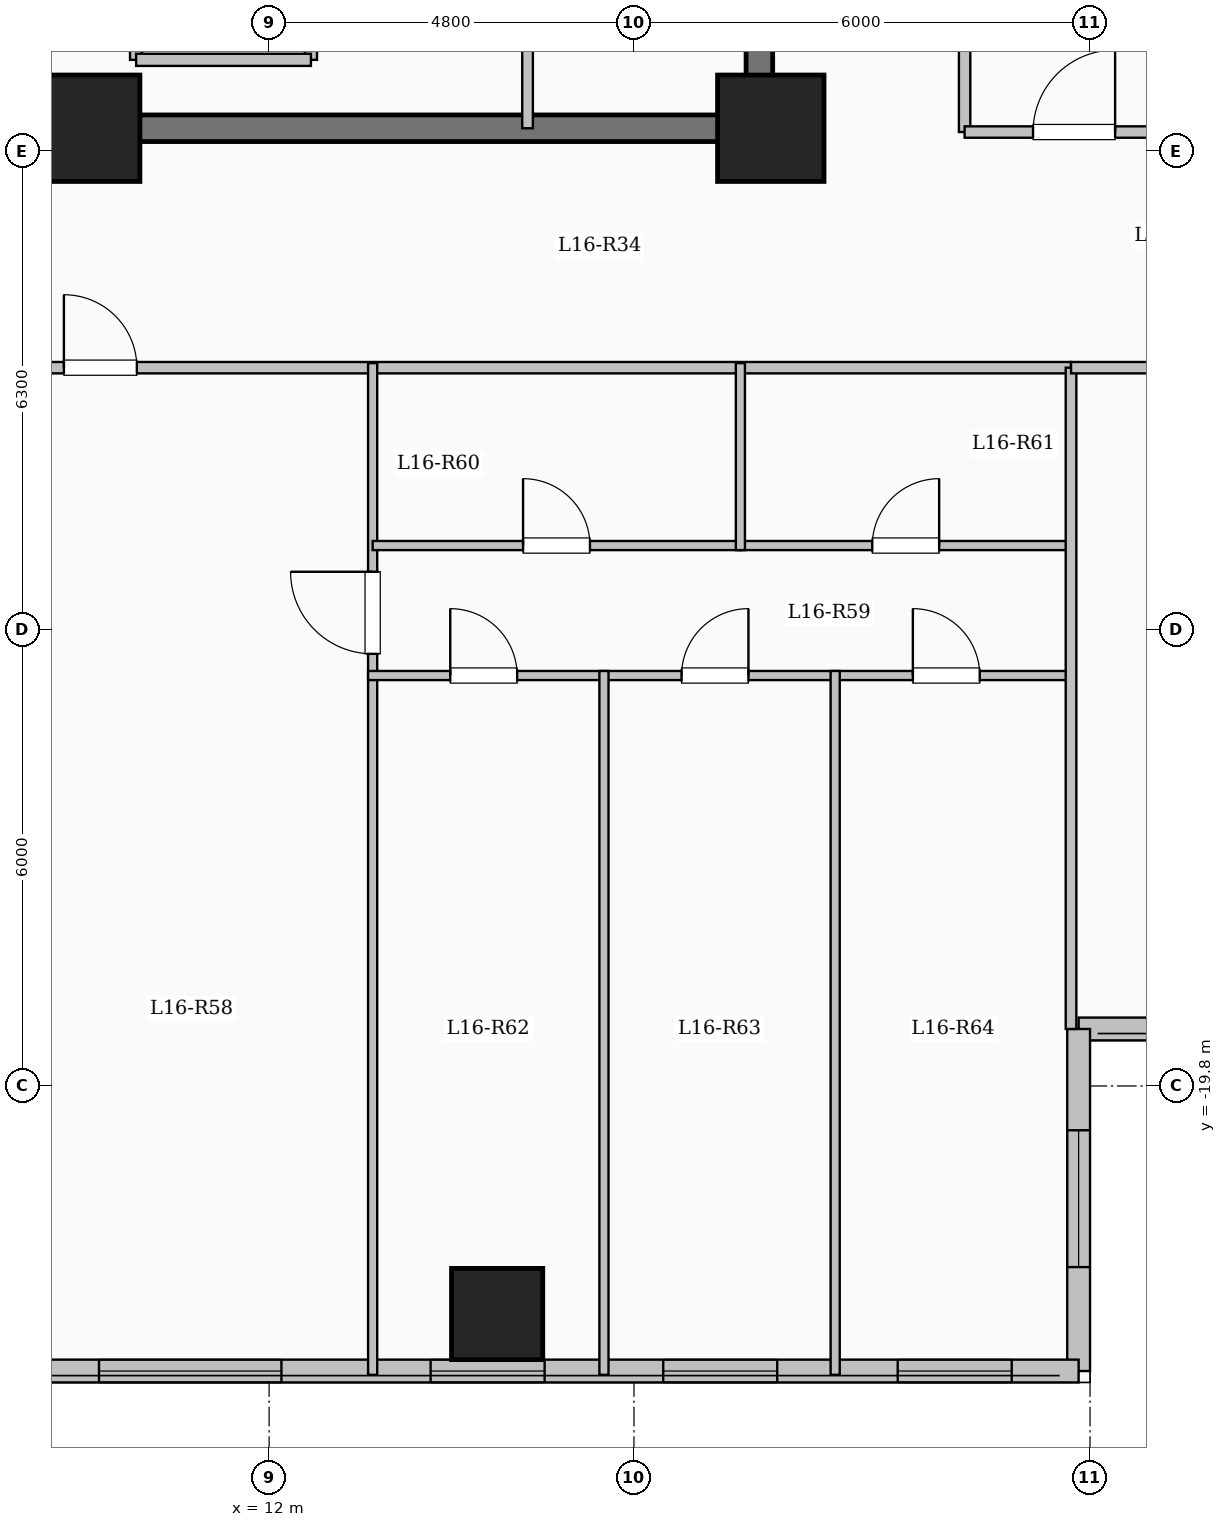
"""IFC4 building model, lengths in metres.
Left out: names, types, materials, properties, quantities, classifications, styles, units other than length and angle.
Written with IfcOpenShell. Run it as: python <this file> out.ifc"""

import sys

from ifc_helpers import new_model, si_unit, direction, frame, frame_2d, origin, origin_2d, place, context, subcontext, project, spatial, rectangle, extrude, element, fill, save


model = new_model("IFC4")
c1 = context("Model", 3, precision=1e-05, world=origin(), true_north=direction((0.0, 1.0)))
c2 = subcontext(c1, "Body", "Model", "MODEL_VIEW")
j1 = project(units=[si_unit("LENGTHUNIT", "METRE"), si_unit("PLANEANGLEUNIT", "RADIAN")], contexts=[c1])
p1 = place(None, origin())
s1 = spatial("IfcSite", under=j1, at=p1, CompositionType="ELEMENT")
p2 = place(p1, origin())
s2 = spatial("IfcBuilding", under=s1, at=p2, CompositionType="ELEMENT")
p3 = place(p2, frame((0.0, 0.0, 60.85)))
s3 = spatial("IfcBuildingStorey", under=s2, at=p3, CompositionType="ELEMENT", Elevation=60.85)
for number, where, z_axis, x_axis in (
    (1, (9.6, -7.2, 0.0), (0.0, 0.0, 1.0), (1.0, 0.0, 0.0)),
    (2, (18.6, -7.2, 0.0), (0.0, 0.0, 1.0), (1.0, 0.0, 0.0)),
):
    element("IfcColumn", number, at=place(p3, frame(where, z_axis=z_axis, x_axis=x_axis)), inside=s3, PredefinedType="COLUMN", context=c2, shape_type="SweptSolid", body=[
        extrude(rectangle(XDim=1.4, YDim=1.4, at=origin_2d()), origin(), (0.0, 0.0, 1.0), 3.35),
    ])
p4 = place(p3, frame((15.0, -22.8, 0.0), z_axis=(0.0, 0.0, 1.0), x_axis=(1.0, 0.0, 0.0)))
e3 = element("IfcColumn", 3, at=p4, inside=s3, PredefinedType="COLUMN", context=c2, shape_type="SweptSolid", body=[
    extrude(rectangle(XDim=1.2, YDim=1.2, at=origin_2d()), origin(), (0.0, 0.0, 1.0), 3.35),
])
p5 = place(p3, frame((28.65, -19.05, 0.0), z_axis=(0.0, 0.0, 1.0), x_axis=(-1.0, 0.0, 0.0)))
e4 = element("IfcWall", 4, at=p5, inside=s3, PredefinedType="SOLIDWALL", context=c2, shape_type="SweptSolid", body=[
    extrude(rectangle(XDim=6.0, YDim=0.3, at=frame_2d((3.0, 0.0))), origin(), (0.0, 0.0, 1.0), 3.05),
])
p6 = place(p5, frame((1.825, 0.0, 0.9)))
e5 = element("IfcOpeningElement", 5, at=p6, cuts=e4, PredefinedType="OPENING", context=c2, shape_type="SweptSolid", body=[
    extrude(rectangle(XDim=2.4, YDim=1.8, at=frame_2d((1.2, 0.9))), frame((0.0, 0.16, 0.0), z_axis=(0.0, -1.0, 0.0), x_axis=(1.0, 0.0, 0.0)), (0.0, 0.0, 1.0), 0.32),
])
p7 = place(p3, frame((22.65, -19.05, 0.0), z_axis=(0.0, 0.0, 1.0), x_axis=(0.0, -1.0, 0.0)))
e6 = element("IfcWall", 6, at=p7, inside=s3, PredefinedType="SOLIDWALL", context=c2, shape_type="SweptSolid", body=[
    extrude(rectangle(XDim=4.5, YDim=0.3, at=frame_2d((2.25, 0.0))), origin(), (0.0, 0.0, 1.0), 3.05),
])
p8 = place(p7, frame((1.333, 0.0, 0.9)))
e7 = element("IfcOpeningElement", 7, at=p8, cuts=e6, PredefinedType="OPENING", context=c2, shape_type="SweptSolid", body=[
    extrude(rectangle(XDim=1.8, YDim=1.65, at=frame_2d((0.9, 0.825))), frame((0.0, 0.16, 0.0), z_axis=(0.0, -1.0, 0.0), x_axis=(1.0, 0.0, 0.0)), (0.0, 0.0, 1.0), 0.32),
])
p9 = place(p3, frame((22.65, -23.55, 0.0), z_axis=(0.0, 0.0, 1.0), x_axis=(-1.0, 0.0, 0.0)))
e8 = element("IfcWall", 8, at=p9, inside=s3, PredefinedType="SOLIDWALL", context=c2, shape_type="SweptSolid", body=[
    extrude(rectangle(XDim=15.3, YDim=0.3, at=frame_2d((7.65, 0.0))), origin(), (0.0, 0.0, 1.0), 3.05),
])
p10 = place(p9, frame((0.88, 0.0, 0.9)))
e9 = element("IfcOpeningElement", 9, at=p10, cuts=e8, PredefinedType="OPENING", context=c2, shape_type="SweptSolid", body=[
    extrude(rectangle(XDim=1.5, YDim=1.65, at=frame_2d((0.75, 0.825))), frame((0.0, 0.16, 0.0), z_axis=(0.0, -1.0, 0.0), x_axis=(1.0, 0.0, 0.0)), (0.0, 0.0, 1.0), 0.32),
])
p11 = place(p9, frame((3.965, 0.0, 0.9)))
e10 = element("IfcOpeningElement", 10, at=p11, cuts=e8, PredefinedType="OPENING", context=c2, shape_type="SweptSolid", body=[
    extrude(rectangle(XDim=1.5, YDim=1.65, at=frame_2d((0.75, 0.825))), frame((0.0, 0.16, 0.0), z_axis=(0.0, -1.0, 0.0), x_axis=(1.0, 0.0, 0.0)), (0.0, 0.0, 1.0), 0.32),
])
p12 = place(p9, frame((7.025, 0.0, 0.9)))
e11 = element("IfcOpeningElement", 11, at=p12, cuts=e8, PredefinedType="OPENING", context=c2, shape_type="SweptSolid", body=[
    extrude(rectangle(XDim=1.5, YDim=1.65, at=frame_2d((0.75, 0.825))), frame((0.0, 0.16, 0.0), z_axis=(0.0, -1.0, 0.0), x_axis=(1.0, 0.0, 0.0)), (0.0, 0.0, 1.0), 0.32),
])
p13 = place(p9, frame((10.488, 0.0, 0.9)))
e12 = element("IfcOpeningElement", 12, at=p13, cuts=e8, PredefinedType="OPENING", context=c2, shape_type="SweptSolid", body=[
    extrude(rectangle(XDim=2.4, YDim=1.8, at=frame_2d((1.2, 0.9))), frame((0.0, 0.16, 0.0), z_axis=(0.0, -1.0, 0.0), x_axis=(1.0, 0.0, 0.0)), (0.0, 0.0, 1.0), 0.32),
])
p14 = place(p9, frame((14.303, 0.0, 0.95)))
e13 = element("IfcOpeningElement", 13, at=p14, cuts=e8, PredefinedType="OPENING", context=c2, shape_type="SweptSolid", body=[
    extrude(rectangle(XDim=0.85, YDim=1.5, at=frame_2d((0.425, 0.75))), frame((0.0, 0.16, 0.0), z_axis=(0.0, -1.0, 0.0), x_axis=(1.0, 0.0, 0.0)), (0.0, 0.0, 1.0), 0.32),
])
for number, where, z_axis, x_axis in (
    (14, (10.25, -6.3, 0.0), (0.0, 0.0, 1.0), (0.0, 1.0, 0.0)),
    (15, (12.55, -6.3, 0.0), (0.0, 0.0, 1.0), (0.0, 1.0, 0.0)),
):
    element("IfcWall", number, at=place(p3, frame(where, z_axis=z_axis, x_axis=x_axis)), inside=s3, PredefinedType="SOLIDWALL", context=c2, shape_type="SweptSolid", body=[
        extrude(rectangle(XDim=2.6, YDim=0.16, at=frame_2d((1.3, 0.0))), origin(), (0.0, 0.0, 1.0), 3.05),
    ])
p15 = place(p3, frame((10.25, -6.3, 0.0), z_axis=(0.0, 0.0, 1.0), x_axis=(1.0, 0.0, 0.0)))
e16 = element("IfcWall", 16, at=p15, inside=s3, PredefinedType="SOLIDWALL", context=c2, shape_type="SweptSolid", body=[
    extrude(rectangle(XDim=2.3, YDim=0.16, at=frame_2d((1.15, 0.0))), origin(), (0.0, 0.0, 1.0), 3.05),
])
p16 = place(p3, frame((18.45, -7.375, 0.0), z_axis=(0.0, 0.0, 1.0), x_axis=(0.0, 1.0, 0.0)))
e17 = element("IfcWall", 17, at=p16, inside=s3, PredefinedType="SHEAR", context=c2, shape_type="SweptSolid", body=[
    extrude(rectangle(XDim=14.05, YDim=0.35, at=frame_2d((7.025, 0.0))), origin(), (0.0, 0.0, 1.0), 3.35),
])
p17 = place(p3, frame((10.075, -7.2, 0.0), z_axis=(0.0, 0.0, 1.0), x_axis=(1.0, 0.0, 0.0)))
e18 = element("IfcWall", 18, at=p17, inside=s3, PredefinedType="SHEAR", context=c2, shape_type="SweptSolid", body=[
    extrude(rectangle(XDim=8.55, YDim=0.35, at=frame_2d((4.275, 0.0))), origin(), (0.0, 0.0, 1.0), 3.35),
])
p18 = place(p3, frame((15.4, -7.2, 0.0), z_axis=(0.0, 0.0, 1.0), x_axis=(0.0, 1.0, 0.0)))
e19 = element("IfcWall", 19, at=p18, inside=s3, PredefinedType="PARTITIONING", context=c2, shape_type="SweptSolid", body=[
    extrude(rectangle(XDim=10.45, YDim=0.14, at=frame_2d((5.225, 0.0))), origin(), (0.0, 0.0, 1.0), 3.05),
])
p19 = place(p18, frame((9.25, 0.0, 0.0)))
e20 = element("IfcOpeningElement", 20, at=p19, cuts=e19, PredefinedType="OPENING", context=c2, shape_type="SweptSolid", body=[
    extrude(rectangle(XDim=0.9, YDim=2.08, at=frame_2d((0.45, 1.04))), frame((0.0, 0.08, 0.0), z_axis=(0.0, -1.0, 0.0), x_axis=(1.0, 0.0, 0.0)), (0.0, 0.0, 1.0), 0.16),
])
p20 = place(p3, frame((21.15, -7.25, 0.0), z_axis=(0.0, 0.0, 1.0), x_axis=(0.0, 1.0, 0.0)))
e21 = element("IfcWall", 21, at=p20, inside=s3, PredefinedType="PARTITIONING", context=c2, shape_type="SweptSolid", body=[
    extrude(rectangle(XDim=18.0, YDim=0.15, at=frame_2d((9.0, 0.0))), origin(), (0.0, 0.0, 1.0), 2.535),
])
p21 = place(p3, frame((8.55, -10.35, 0.0), z_axis=(0.0, 0.0, 1.0), x_axis=(1.0, 0.0, 0.0)))
e22 = element("IfcWall", 22, at=p21, inside=s3, PredefinedType="PARTITIONING", context=c2, shape_type="SweptSolid", body=[
    extrude(rectangle(XDim=14.0, YDim=0.15, at=frame_2d((7.0, 0.0))), origin(), (0.0, 0.0, 1.0), 3.05),
])
p22 = place(p21, frame((0.75, 0.0, 0.0)))
e23 = element("IfcOpeningElement", 23, at=p22, cuts=e22, PredefinedType="OPENING", context=c2, shape_type="SweptSolid", body=[
    extrude(rectangle(XDim=0.96, YDim=2.15, at=frame_2d((0.48, 1.075))), frame((0.0, 0.085, 0.0), z_axis=(0.0, -1.0, 0.0), x_axis=(1.0, 0.0, 0.0)), (0.0, 0.0, 1.0), 0.17),
])
p23 = place(p3, frame((13.362, -23.6, 0.0), z_axis=(0.0, 0.0, 1.0), x_axis=(0.0, 1.0, 0.0)))
e24 = element("IfcWall", 24, at=p23, inside=s3, PredefinedType="PARTITIONING", context=c2, shape_type="SweptSolid", body=[
    extrude(rectangle(XDim=13.31, YDim=0.12, at=frame_2d((6.655, 0.0))), origin(), (0.0, 0.0, 1.0), 3.05),
])
p24 = place(p23, frame((9.485, 0.0, 0.0)))
e25 = element("IfcOpeningElement", 25, at=p24, cuts=e24, PredefinedType="OPENING", context=c2, shape_type="SweptSolid", body=[
    extrude(rectangle(XDim=1.08, YDim=2.15, at=frame_2d((0.54, 1.075))), frame((0.0, 0.07, 0.0), z_axis=(0.0, -1.0, 0.0), x_axis=(1.0, 0.0, 0.0)), (0.0, 0.0, 1.0), 0.14),
])
p25 = place(p3, frame((13.362, -12.69, 0.0), z_axis=(0.0, 0.0, 1.0), x_axis=(1.0, 0.0, 0.0)))
e26 = element("IfcWall", 26, at=p25, inside=s3, PredefinedType="PARTITIONING", context=c2, shape_type="SweptSolid", body=[
    extrude(rectangle(XDim=4.838, YDim=0.12, at=frame_2d((2.419, 0.0))), origin(), (0.0, 0.0, 1.0), 2.535),
])
p26 = place(p25, frame((1.979, 0.0, 0.0)))
e27 = element("IfcOpeningElement", 27, at=p26, cuts=e26, PredefinedType="OPENING", context=c2, shape_type="SweptSolid", body=[
    extrude(rectangle(XDim=0.88, YDim=2.1, at=frame_2d((0.44, 1.05))), frame((0.0, 0.07, 0.0), z_axis=(0.0, -1.0, 0.0), x_axis=(1.0, 0.0, 0.0)), (0.0, 0.0, 1.0), 0.14),
])
p27 = place(p3, frame((18.2, -12.69, 0.0), z_axis=(0.0, 0.0, 1.0), x_axis=(1.0, 0.0, 0.0)))
e28 = element("IfcWall", 28, at=p27, inside=s3, PredefinedType="PARTITIONING", context=c2, shape_type="SweptSolid", body=[
    extrude(rectangle(XDim=4.35, YDim=0.12, at=frame_2d((2.175, 0.0))), origin(), (0.0, 0.0, 1.0), 3.05),
])
p28 = place(p27, frame((1.735, 0.0, 0.0)))
e29 = element("IfcOpeningElement", 29, at=p28, cuts=e28, PredefinedType="OPENING", context=c2, shape_type="SweptSolid", body=[
    extrude(rectangle(XDim=0.88, YDim=2.1, at=frame_2d((0.44, 1.05))), frame((0.0, 0.07, 0.0), z_axis=(0.0, -1.0, 0.0), x_axis=(1.0, 0.0, 0.0)), (0.0, 0.0, 1.0), 0.14),
])
p29 = place(p3, frame((13.302, -14.4, 0.0), z_axis=(0.0, 0.0, 1.0), x_axis=(1.0, 0.0, 0.0)))
e30 = element("IfcWall", 30, at=p29, inside=s3, PredefinedType="PARTITIONING", context=c2, shape_type="SweptSolid", body=[
    extrude(rectangle(XDim=9.308, YDim=0.12, at=frame_2d((4.654, 0.0))), origin(), (0.0, 0.0, 1.0), 3.05),
])
p30 = place(p29, frame((1.081, 0.0, 0.0)))
e31 = element("IfcOpeningElement", 31, at=p30, cuts=e30, PredefinedType="OPENING", context=c2, shape_type="SweptSolid", body=[
    extrude(rectangle(XDim=0.88, YDim=2.1, at=frame_2d((0.44, 1.05))), frame((0.0, 0.07, 0.0), z_axis=(0.0, -1.0, 0.0), x_axis=(1.0, 0.0, 0.0)), (0.0, 0.0, 1.0), 0.14),
])
p31 = place(p29, frame((4.124, 0.0, 0.0)))
e32 = element("IfcOpeningElement", 32, at=p31, cuts=e30, PredefinedType="OPENING", context=c2, shape_type="SweptSolid", body=[
    extrude(rectangle(XDim=0.88, YDim=2.1, at=frame_2d((0.44, 1.05))), frame((0.0, 0.07, 0.0), z_axis=(0.0, -1.0, 0.0), x_axis=(1.0, 0.0, 0.0)), (0.0, 0.0, 1.0), 0.14),
])
p32 = place(p29, frame((7.167, 0.0, 0.0)))
e33 = element("IfcOpeningElement", 33, at=p32, cuts=e30, PredefinedType="OPENING", context=c2, shape_type="SweptSolid", body=[
    extrude(rectangle(XDim=0.88, YDim=2.1, at=frame_2d((0.44, 1.05))), frame((0.0, 0.07, 0.0), z_axis=(0.0, -1.0, 0.0), x_axis=(1.0, 0.0, 0.0)), (0.0, 0.0, 1.0), 0.14),
])
p33 = place(p3, frame((18.2, -12.75, 0.0), z_axis=(0.0, 0.0, 1.0), x_axis=(0.0, 1.0, 0.0)))
e34 = element("IfcWall", 34, at=p33, inside=s3, PredefinedType="PARTITIONING", context=c2, shape_type="SweptSolid", body=[
    extrude(rectangle(XDim=2.46, YDim=0.12, at=frame_2d((1.23, 0.0))), origin(), (0.0, 0.0, 1.0), 3.05),
])
for number, where, z_axis, x_axis in (
    (35, (16.405, -23.6, 0.0), (0.0, 0.0, 1.0), (0.0, 1.0, 0.0)),
    (36, (19.447, -23.6, 0.0), (0.0, 0.0, 1.0), (0.0, 1.0, 0.0)),
):
    element("IfcWall", number, at=place(p3, frame(where, z_axis=z_axis, x_axis=x_axis)), inside=s3, PredefinedType="PARTITIONING", context=c2, shape_type="SweptSolid", body=[
        extrude(rectangle(XDim=9.26, YDim=0.12, at=frame_2d((4.63, 0.0))), origin(), (0.0, 0.0, 1.0), 3.05),
    ])
p34 = place(p3, frame((21.15, -7.25, 0.0), z_axis=(0.0, 0.0, 1.0), x_axis=(1.0, 0.0, 0.0)))
e37 = element("IfcWall", 37, at=p34, inside=s3, PredefinedType="PARTITIONING", context=c2, shape_type="SweptSolid", body=[
    extrude(rectangle(XDim=7.53, YDim=0.15, at=frame_2d((3.765, 0.0))), origin(), (0.0, 0.0, 1.0), 3.05),
])
p35 = place(p34, frame((0.9, 0.0, 0.0)))
e38 = element("IfcOpeningElement", 38, at=p35, cuts=e37, PredefinedType="OPENING", context=c2, shape_type="SweptSolid", body=[
    extrude(rectangle(XDim=1.08, YDim=2.15, at=frame_2d((0.54, 1.075))), frame((0.0, 0.085, 0.0), z_axis=(0.0, -1.0, 0.0), x_axis=(1.0, 0.0, 0.0)), (0.0, 0.0, 1.0), 0.17),
])
p36 = place(p3, frame((22.55, -19.05, 0.0), z_axis=(0.0, 0.0, 1.0), x_axis=(0.0, 1.0, 0.0)))
e39 = element("IfcWall", 39, at=p36, inside=s3, PredefinedType="PARTITIONING", context=c2, shape_type="SweptSolid", body=[
    extrude(rectangle(XDim=8.7, YDim=0.14, at=frame_2d((4.35, 0.0))), origin(), (0.0, 0.0, 1.0), 3.05),
])
p37 = place(p3, frame((22.55, -10.35, 0.0), z_axis=(0.0, 0.0, 1.0), x_axis=(1.0, 0.0, 0.0)))
e40 = element("IfcWall", 40, at=p37, inside=s3, PredefinedType="PARTITIONING", context=c2, shape_type="SweptSolid", body=[
    extrude(rectangle(XDim=6.13, YDim=0.15, at=frame_2d((3.065, 0.0))), origin(), (0.0, 0.0, 1.0), 3.05),
])
p38 = place(p37, frame((2.59, 0.0, 0.0)))
e41 = element("IfcOpeningElement", 41, at=p38, cuts=e40, PredefinedType="OPENING", context=c2, shape_type="SweptSolid", body=[
    extrude(rectangle(XDim=0.95, YDim=2.15, at=frame_2d((0.475, 1.075))), frame((0.0, 0.085, 0.0), z_axis=(0.0, -1.0, 0.0), x_axis=(1.0, 0.0, 0.0)), (0.0, 0.0, 1.0), 0.17),
])
p39 = place(p8, origin())
e42 = element("IfcWindow", 42, at=p39, inside=s3, PartitioningType="SINGLE_PANEL", PredefinedType="WINDOW", context=c2, shape_type="SweptSolid", body=[
    extrude(rectangle(XDim=1.8, YDim=1.65, at=frame_2d((0.9, 0.825))), frame((0.0, 0.03, 0.0), z_axis=(0.0, -1.0, 0.0), x_axis=(1.0, 0.0, 0.0)), (0.0, 0.0, 1.0), 0.06),
])
fill(e7, e42)
p40 = place(p10, origin())
e43 = element("IfcWindow", 43, at=p40, inside=s3, PartitioningType="SINGLE_PANEL", PredefinedType="WINDOW", context=c2, shape_type="SweptSolid", body=[
    extrude(rectangle(XDim=1.5, YDim=1.65, at=frame_2d((0.75, 0.825))), frame((0.0, 0.03, 0.0), z_axis=(0.0, -1.0, 0.0), x_axis=(1.0, 0.0, 0.0)), (0.0, 0.0, 1.0), 0.06),
])
fill(e9, e43)
p41 = place(p11, origin())
e44 = element("IfcWindow", 44, at=p41, inside=s3, PartitioningType="SINGLE_PANEL", PredefinedType="WINDOW", context=c2, shape_type="SweptSolid", body=[
    extrude(rectangle(XDim=1.5, YDim=1.65, at=frame_2d((0.75, 0.825))), frame((0.0, 0.03, 0.0), z_axis=(0.0, -1.0, 0.0), x_axis=(1.0, 0.0, 0.0)), (0.0, 0.0, 1.0), 0.06),
])
fill(e10, e44)
p42 = place(p12, origin())
e45 = element("IfcWindow", 45, at=p42, inside=s3, PartitioningType="SINGLE_PANEL", PredefinedType="WINDOW", context=c2, shape_type="SweptSolid", body=[
    extrude(rectangle(XDim=1.5, YDim=1.65, at=frame_2d((0.75, 0.825))), frame((0.0, 0.03, 0.0), z_axis=(0.0, -1.0, 0.0), x_axis=(1.0, 0.0, 0.0)), (0.0, 0.0, 1.0), 0.06),
])
fill(e11, e45)
p43 = place(p13, origin())
e46 = element("IfcWindow", 46, at=p43, inside=s3, PartitioningType="SINGLE_PANEL", PredefinedType="WINDOW", context=c2, shape_type="SweptSolid", body=[
    extrude(rectangle(XDim=2.4, YDim=1.8, at=frame_2d((1.2, 0.9))), frame((0.0, 0.03, 0.0), z_axis=(0.0, -1.0, 0.0), x_axis=(1.0, 0.0, 0.0)), (0.0, 0.0, 1.0), 0.06),
])
fill(e12, e46)
p44 = place(p22, origin())
e47 = element("IfcDoor", 47, at=p44, inside=s3, OperationType="SINGLE_SWING_LEFT", PredefinedType="DOOR", context=c2, shape_type="SweptSolid", body=[
    extrude(rectangle(XDim=0.96, YDim=2.15, at=frame_2d((0.48, 1.075))), frame((0.0, 0.025, 0.0), z_axis=(0.0, -1.0, 0.0), x_axis=(1.0, 0.0, 0.0)), (0.0, 0.0, 1.0), 0.05),
])
fill(e23, e47)
p45 = place(p24, origin())
e48 = element("IfcDoor", 48, at=p45, inside=s3, OperationType="SINGLE_SWING_RIGHT", PredefinedType="DOOR", context=c2, shape_type="SweptSolid", body=[
    extrude(rectangle(XDim=1.08, YDim=2.15, at=frame_2d((0.54, 1.075))), frame((0.0, 0.025, 0.0), z_axis=(0.0, -1.0, 0.0), x_axis=(1.0, 0.0, 0.0)), (0.0, 0.0, 1.0), 0.05),
])
fill(e25, e48)
p46 = place(p26, origin())
e49 = element("IfcDoor", 49, at=p46, inside=s3, OperationType="SINGLE_SWING_LEFT", PredefinedType="DOOR", context=c2, shape_type="SweptSolid", body=[
    extrude(rectangle(XDim=0.88, YDim=2.1, at=frame_2d((0.44, 1.05))), frame((0.0, 0.025, 0.0), z_axis=(0.0, -1.0, 0.0), x_axis=(1.0, 0.0, 0.0)), (0.0, 0.0, 1.0), 0.05),
])
fill(e27, e49)
p47 = place(p28, origin())
e50 = element("IfcDoor", 50, at=p47, inside=s3, OperationType="SINGLE_SWING_RIGHT", PredefinedType="DOOR", context=c2, shape_type="SweptSolid", body=[
    extrude(rectangle(XDim=0.88, YDim=2.1, at=frame_2d((0.44, 1.05))), frame((0.0, 0.025, 0.0), z_axis=(0.0, -1.0, 0.0), x_axis=(1.0, 0.0, 0.0)), (0.0, 0.0, 1.0), 0.05),
])
fill(e29, e50)
p48 = place(p30, origin())
e51 = element("IfcDoor", 51, at=p48, inside=s3, OperationType="SINGLE_SWING_LEFT", PredefinedType="DOOR", context=c2, shape_type="SweptSolid", body=[
    extrude(rectangle(XDim=0.88, YDim=2.1, at=frame_2d((0.44, 1.05))), frame((0.0, 0.025, 0.0), z_axis=(0.0, -1.0, 0.0), x_axis=(1.0, 0.0, 0.0)), (0.0, 0.0, 1.0), 0.05),
])
fill(e31, e51)
p49 = place(p31, origin())
e52 = element("IfcDoor", 52, at=p49, inside=s3, OperationType="SINGLE_SWING_RIGHT", PredefinedType="DOOR", context=c2, shape_type="SweptSolid", body=[
    extrude(rectangle(XDim=0.88, YDim=2.1, at=frame_2d((0.44, 1.05))), frame((0.0, 0.025, 0.0), z_axis=(0.0, -1.0, 0.0), x_axis=(1.0, 0.0, 0.0)), (0.0, 0.0, 1.0), 0.05),
])
fill(e32, e52)
p50 = place(p32, origin())
e53 = element("IfcDoor", 53, at=p50, inside=s3, OperationType="SINGLE_SWING_LEFT", PredefinedType="DOOR", context=c2, shape_type="SweptSolid", body=[
    extrude(rectangle(XDim=0.88, YDim=2.1, at=frame_2d((0.44, 1.05))), frame((0.0, 0.025, 0.0), z_axis=(0.0, -1.0, 0.0), x_axis=(1.0, 0.0, 0.0)), (0.0, 0.0, 1.0), 0.05),
])
fill(e33, e53)
p51 = place(p35, origin())
e54 = element("IfcDoor", 54, at=p51, inside=s3, OperationType="SINGLE_SWING_RIGHT", PredefinedType="DOOR", context=c2, shape_type="SweptSolid", body=[
    extrude(rectangle(XDim=1.08, YDim=2.15, at=frame_2d((0.54, 1.075))), frame((0.0, 0.025, 0.0), z_axis=(0.0, -1.0, 0.0), x_axis=(1.0, 0.0, 0.0)), (0.0, 0.0, 1.0), 0.05),
])
fill(e38, e54)
save(model, sys.argv[1])
